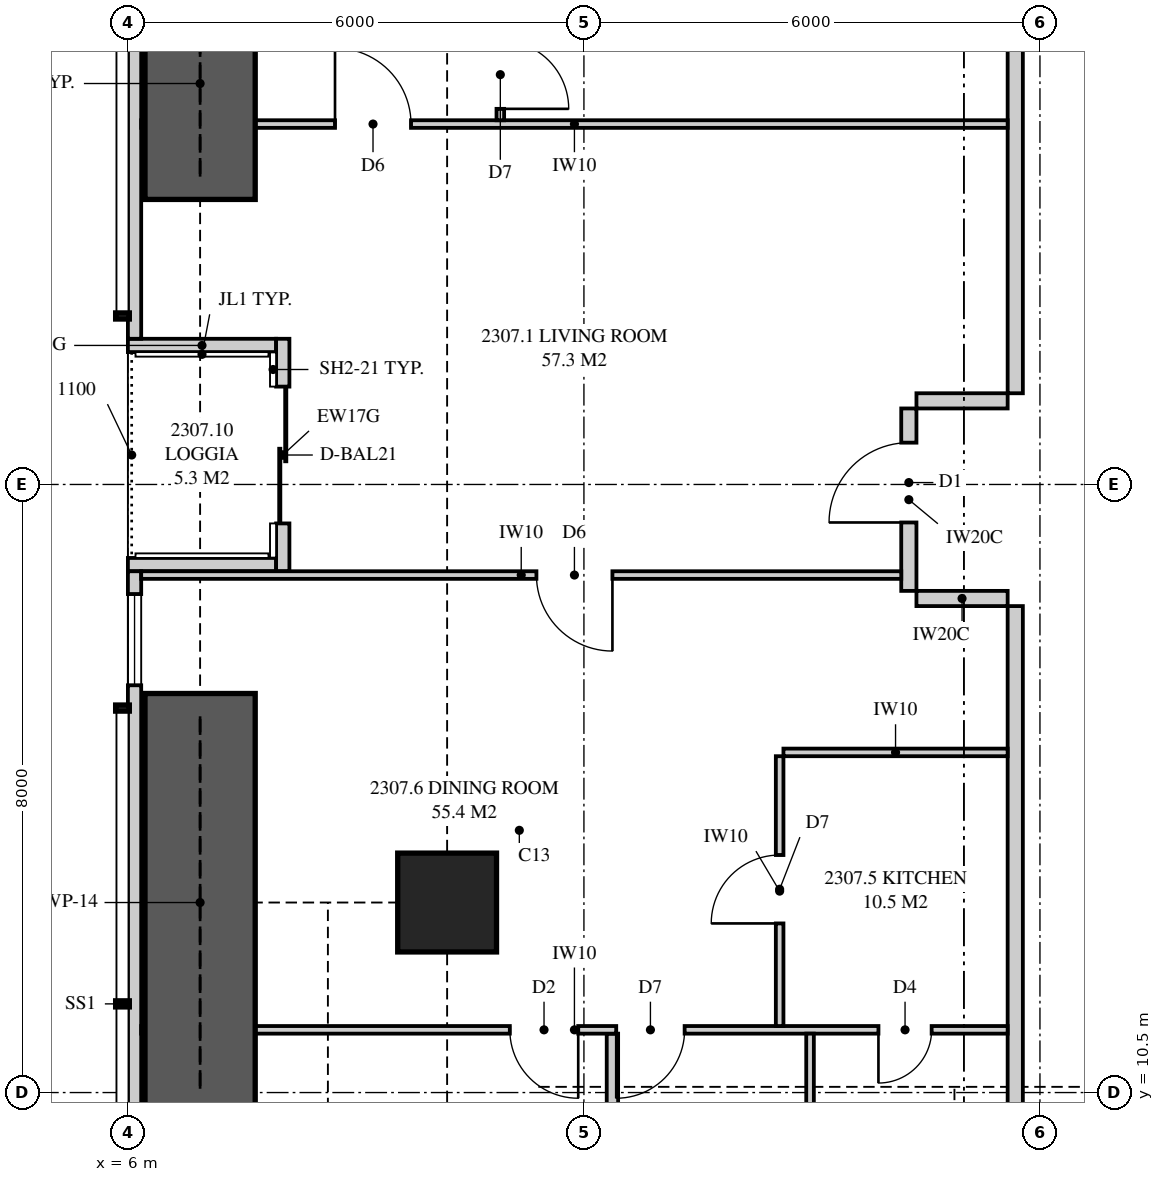
"""IFC4 building model, lengths in metres.
Left out: names, types, materials, properties, quantities, classifications, styles, units other than length and angle.
Written with IfcOpenShell. Run it as: python <this file> out.ifc"""

import sys

from ifc_helpers import new_model, si_unit, direction, frame, frame_2d, origin, origin_2d, place, context, subcontext, project, spatial, polyline, rectangle, outline, extrude, element, fill, save


model = new_model("IFC4")
c1 = context("Model", 3, precision=1e-05, world=origin(), true_north=direction((0.0, 1.0)))
c2 = subcontext(c1, "Body", "Model", "MODEL_VIEW")
j1 = project(units=[si_unit("LENGTHUNIT", "METRE"), si_unit("PLANEANGLEUNIT", "RADIAN")], contexts=[c1])
p1 = place(None, origin())
s1 = spatial("IfcSite", under=j1, at=p1, CompositionType="ELEMENT")
p2 = place(p1, origin())
s2 = spatial("IfcBuilding", under=s1, at=p2, CompositionType="ELEMENT")
p3 = place(p2, frame((0.0, 0.0, 88.1)))
s3 = spatial("IfcBuildingStorey", under=s2, at=p3, CompositionType="ELEMENT", Elevation=88.1)
p4 = place(p3, frame((10.2, 13.0, 0.0), z_axis=(0.0, 0.0, 1.0), x_axis=(1.0, 0.0, 0.0)))
e1 = element("IfcColumn", 1, at=p4, inside=s3, PredefinedType="COLUMN", context=c2, shape_type="SweptSolid", body=[
    extrude(rectangle(XDim=1.3, YDim=1.3, at=origin_2d()), origin(), (0.0, 0.0, 1.0), 3.35),
])
p5 = place(p3, frame((6.087, 34.949, 0.0), z_axis=(0.0, 0.0, 1.0), x_axis=(0.0, -1.0, 0.0)))
e2 = element("IfcWall", 2, at=p5, inside=s3, PredefinedType="SOLIDWALL", context=c2, shape_type="SweptSolid", body=[
    extrude(outline(polyline([(0.0, 0.0), (14.532, 0.0), (14.532, 2.15), (9.949, 2.15), (9.949, 3.11), (9.823, 3.11), (9.823, 2.15), (9.73, 2.15), (9.73, 3.11), (0.0, 3.11), (0.0, 0.0)])), frame((0.0, 0.087, 0.0), z_axis=(0.0, -1.0, 0.0), x_axis=(1.0, 0.0, 0.0)), (0.0, 0.0, 1.0), 0.175),
])
p6 = place(p5, frame((2.724, 0.0, 0.4)))
e3 = element("IfcOpeningElement", 3, at=p6, cuts=e2, PredefinedType="OPENING", context=c2, shape_type="SweptSolid", body=[
    extrude(rectangle(XDim=1.8, YDim=1.7, at=frame_2d((0.9, 0.85))), frame((0.0, 0.097, 0.0), z_axis=(0.0, -1.0, 0.0), x_axis=(1.0, 0.0, 0.0)), (0.0, 0.0, 1.0), 0.195),
])
p7 = place(p5, frame((5.874, 0.0, 0.4)))
e4 = element("IfcOpeningElement", 4, at=p7, cuts=e2, PredefinedType="OPENING", context=c2, shape_type="SweptSolid", body=[
    extrude(rectangle(XDim=1.2, YDim=1.7, at=frame_2d((0.6, 0.85))), frame((0.0, 0.097, 0.0), z_axis=(0.0, -1.0, 0.0), x_axis=(1.0, 0.0, 0.0)), (0.0, 0.0, 1.0), 0.195),
])
p8 = place(p3, frame((6.087, 17.358, 0.0), z_axis=(0.0, 0.0, 1.0), x_axis=(0.0, -1.0, 0.0)))
e5 = element("IfcWall", 5, at=p8, inside=s3, PredefinedType="SOLIDWALL", context=c2, shape_type="SweptSolid", body=[
    extrude(outline(polyline([(0.0, 0.0), (14.307, 0.0), (14.307, 3.11), (4.577, 3.11), (4.577, 2.15), (4.484, 2.15), (4.484, 3.11), (4.358, 3.11), (4.358, 2.15), (0.0, 2.15), (0.0, 0.0)])), frame((0.0, 0.087, 0.0), z_axis=(0.0, -1.0, 0.0), x_axis=(1.0, 0.0, 0.0)), (0.0, 0.0, 1.0), 0.175),
])
p9 = place(p8, frame((0.3, 0.0, 0.4)))
e6 = element("IfcOpeningElement", 6, at=p9, cuts=e5, PredefinedType="OPENING", context=c2, shape_type="SweptSolid", body=[
    extrude(rectangle(XDim=1.2, YDim=1.7, at=frame_2d((0.6, 0.85))), frame((0.0, 0.097, 0.0), z_axis=(0.0, -1.0, 0.0), x_axis=(1.0, 0.0, 0.0)), (0.0, 0.0, 1.0), 0.195),
])
p10 = place(p8, frame((7.233, 0.0, 0.4)))
e7 = element("IfcOpeningElement", 7, at=p10, cuts=e5, PredefinedType="OPENING", context=c2, shape_type="SweptSolid", body=[
    extrude(rectangle(XDim=1.8, YDim=1.7, at=frame_2d((0.9, 0.85))), frame((0.0, 0.097, 0.0), z_axis=(0.0, -1.0, 0.0), x_axis=(1.0, 0.0, 0.0)), (0.0, 0.0, 1.0), 0.195),
])
p11 = place(p8, frame((10.283, 0.0, 0.4)))
e8 = element("IfcOpeningElement", 8, at=p11, cuts=e5, PredefinedType="OPENING", context=c2, shape_type="SweptSolid", body=[
    extrude(rectangle(XDim=1.8, YDim=1.7, at=frame_2d((0.9, 0.85))), frame((0.0, 0.097, 0.0), z_axis=(0.0, -1.0, 0.0), x_axis=(1.0, 0.0, 0.0)), (0.0, 0.0, 1.0), 0.195),
])
p12 = place(p3, frame((8.038, 20.417, 0.0), z_axis=(0.0, 0.0, 1.0), x_axis=(0.0, -1.0, 0.0)))
e9 = element("IfcWall", 9, at=p12, inside=s3, PredefinedType="SOLIDWALL", context=c2, shape_type="SweptSolid", body=[
    extrude(rectangle(XDim=3.058, YDim=0.175, at=frame_2d((1.529, 0.0))), origin(), (0.0, 0.0, 1.0), 3.11),
])
p13 = place(p12, frame((0.629, 0.0, 0.0)))
e10 = element("IfcOpeningElement", 10, at=p13, cuts=e9, PredefinedType="OPENING", context=c2, shape_type="SweptSolid", body=[
    extrude(rectangle(XDim=1.8, YDim=2.1, at=frame_2d((0.9, 1.05))), frame((0.0, 0.097, 0.0), z_axis=(0.0, -1.0, 0.0), x_axis=(1.0, 0.0, 0.0)), (0.0, 0.0, 1.0), 0.195),
])
for number, where, z_axis, x_axis in (
    (11, (6.0, 20.329, 0.0), (0.0, 0.0, 1.0), (1.0, 0.0, 0.0)),
    (12, (6.0, 17.446, 0.0), (0.0, 0.0, 1.0), (1.0, 0.0, 0.0)),
):
    element("IfcWall", number, at=place(p3, frame(where, z_axis=z_axis, x_axis=x_axis)), inside=s3, PredefinedType="SOLIDWALL", context=c2, shape_type="SweptSolid", body=[
        extrude(outline(polyline([(0.0, 0.0), (1.95, 0.0), (1.95, 3.11), (1.75, 3.11), (1.75, 2.15), (0.15, 2.15), (0.15, 3.11), (0.0, 3.11), (0.0, 0.0)])), frame((0.0, 0.087, 0.0), z_axis=(0.0, -1.0, 0.0), x_axis=(1.0, 0.0, 0.0)), (0.0, 0.0, 1.0), 0.175),
    ])
p14 = place(p3, frame((17.675, 7.825, 0.0), z_axis=(0.0, 0.0, 1.0), x_axis=(0.0, 1.0, 0.0)))
e13 = element("IfcWall", 13, at=p14, inside=s3, PredefinedType="PARTITIONING", context=c2, shape_type="SweptSolid", body=[
    extrude(outline(polyline([(0.0, 0.0), (9.075, 0.0), (9.075, 3.11), (3.096, 3.11), (3.096, 2.531), (2.404, 2.531), (2.404, 3.11), (0.0, 3.11), (0.0, 0.0)])), frame((0.0, 0.1, 0.0), z_axis=(0.0, -1.0, 0.0), x_axis=(1.0, 0.0, 0.0)), (0.0, 0.0, 1.0), 0.2),
])
p15 = place(p3, frame((6.175, 11.325, 0.0), z_axis=(0.0, 0.0, 1.0), x_axis=(1.0, 0.0, 0.0)))
e14 = element("IfcWall", 14, at=p15, inside=s3, PredefinedType="PARTITIONING", context=c2, shape_type="SweptSolid", body=[
    extrude(outline(polyline([(0.175, 3.11), (0.0, 3.11), (0.0, 0.0), (0.526, 0.0), (0.526, 0.337), (1.024, 0.337), (1.024, 0.0), (11.4, 0.0), (11.4, 3.11), (5.285, 3.11), (5.285, 2.51), (2.765, 2.51), (2.765, 3.11), (2.753, 3.11), (2.753, 2.531), (2.16, 2.531), (2.16, 3.11), (1.918, 3.11), (1.918, 2.15), (1.024, 2.15), (1.024, 1.813), (0.526, 1.813), (0.526, 2.15), (0.175, 2.15), (0.175, 3.11)])), frame((0.0, 0.05, 0.0), z_axis=(0.0, -1.0, 0.0), x_axis=(1.0, 0.0, 0.0)), (0.0, 0.0, 1.0), 0.1),
])
p16 = place(p15, frame((4.85, 0.0, 0.0)))
e15 = element("IfcOpeningElement", 15, at=p16, cuts=e14, PredefinedType="OPENING", context=c2, shape_type="SweptSolid", body=[
    extrude(rectangle(XDim=0.9, YDim=2.1, at=frame_2d((0.45, 1.05))), frame((0.0, 0.06, 0.0), z_axis=(0.0, -1.0, 0.0), x_axis=(1.0, 0.0, 0.0)), (0.0, 0.0, 1.0), 0.12),
])
p17 = place(p15, frame((6.25, 0.0, 0.0)))
e16 = element("IfcOpeningElement", 16, at=p17, cuts=e14, PredefinedType="OPENING", context=c2, shape_type="SweptSolid", body=[
    extrude(rectangle(XDim=0.9, YDim=2.1, at=frame_2d((0.45, 1.05))), frame((0.0, 0.06, 0.0), z_axis=(0.0, -1.0, 0.0), x_axis=(1.0, 0.0, 0.0)), (0.0, 0.0, 1.0), 0.12),
])
p18 = place(p15, frame((9.7, 0.0, 0.0)))
e17 = element("IfcOpeningElement", 17, at=p18, cuts=e14, PredefinedType="OPENING", context=c2, shape_type="SweptSolid", body=[
    extrude(rectangle(XDim=0.7, YDim=2.1, at=frame_2d((0.35, 1.05))), frame((0.0, 0.06, 0.0), z_axis=(0.0, -1.0, 0.0), x_axis=(1.0, 0.0, 0.0)), (0.0, 0.0, 1.0), 0.12),
])
p19 = place(p3, frame((12.375, 7.825, 0.0), z_axis=(0.0, 0.0, 1.0), x_axis=(0.0, 1.0, 0.0)))
e18 = element("IfcWall", 18, at=p19, inside=s3, PredefinedType="PLUMBINGWALL", context=c2, shape_type="SweptSolid", body=[
    extrude(outline(polyline([(0.0, 0.0), (3.45, 0.0), (3.45, 3.11), (3.071, 3.11), (3.071, 2.531), (2.429, 2.531), (2.429, 3.11), (0.0, 3.11), (0.0, 0.0)])), frame((0.0, 0.075, 0.0), z_axis=(0.0, -1.0, 0.0), x_axis=(1.0, 0.0, 0.0)), (0.0, 0.0, 1.0), 0.15),
])
p20 = place(p3, frame((14.975, 7.825, 0.0), z_axis=(0.0, 0.0, 1.0), x_axis=(0.0, 1.0, 0.0)))
e19 = element("IfcWall", 19, at=p20, inside=s3, PredefinedType="PARTITIONING", context=c2, shape_type="SweptSolid", body=[
    extrude(outline(polyline([(0.0, 0.0), (3.45, 0.0), (3.45, 3.11), (3.046, 3.11), (3.046, 2.531), (2.454, 2.531), (2.454, 3.11), (0.0, 3.11), (0.0, 0.0)])), frame((0.0, 0.05, 0.0), z_axis=(0.0, -1.0, 0.0), x_axis=(1.0, 0.0, 0.0)), (0.0, 0.0, 1.0), 0.1),
])
p21 = place(p3, frame((14.575, 11.375, 0.0), z_axis=(0.0, 0.0, 1.0), x_axis=(0.0, 1.0, 0.0)))
e20 = element("IfcWall", 20, at=p21, inside=s3, PredefinedType="PARTITIONING", context=c2, shape_type="SweptSolid", body=[
    extrude(rectangle(XDim=3.55, YDim=0.1, at=frame_2d((1.775, 0.0))), origin(), (0.0, 0.0, 1.0), 3.11),
])
p22 = place(p21, frame((1.35, 0.0, 0.0)))
e21 = element("IfcOpeningElement", 21, at=p22, cuts=e20, PredefinedType="OPENING", context=c2, shape_type="SweptSolid", body=[
    extrude(rectangle(XDim=0.9, YDim=2.1, at=frame_2d((0.45, 1.05))), frame((0.0, 0.06, 0.0), z_axis=(0.0, -1.0, 0.0), x_axis=(1.0, 0.0, 0.0)), (0.0, 0.0, 1.0), 0.12),
])
p23 = place(p3, frame((14.625, 14.975, 0.0), z_axis=(0.0, 0.0, 1.0), x_axis=(1.0, 0.0, 0.0)))
e22 = element("IfcWall", 22, at=p23, inside=s3, PredefinedType="PARTITIONING", context=c2, shape_type="SweptSolid", body=[
    extrude(rectangle(XDim=2.95, YDim=0.1, at=frame_2d((1.475, 0.0))), origin(), (0.0, 0.0, 1.0), 3.11),
])
p24 = place(p3, frame((6.175, 17.308, 0.0), z_axis=(0.0, 0.0, 1.0), x_axis=(1.0, 0.0, 0.0)))
e23 = element("IfcWall", 23, at=p24, inside=s3, PredefinedType="PARTITIONING", context=c2, shape_type="SweptSolid", body=[
    extrude(outline(polyline([(0.0, 0.0), (10.0, 0.0), (10.0, 3.11), (5.285, 3.11), (5.285, 2.51), (2.765, 2.51), (2.765, 3.11), (1.635, 3.11), (1.635, 2.15), (0.0, 2.15), (0.0, 3.11), (0.0, 0.0)])), frame((0.0, 0.05, 0.0), z_axis=(0.0, -1.0, 0.0), x_axis=(1.0, 0.0, 0.0)), (0.0, 0.0, 1.0), 0.1),
])
p25 = place(p24, frame((5.2, 0.0, 0.0)))
e24 = element("IfcOpeningElement", 24, at=p25, cuts=e23, PredefinedType="OPENING", context=c2, shape_type="SweptSolid", body=[
    extrude(rectangle(XDim=1.0, YDim=2.1, at=frame_2d((0.5, 1.05))), frame((0.0, 0.06, 0.0), z_axis=(0.0, -1.0, 0.0), x_axis=(1.0, 0.0, 0.0)), (0.0, 0.0, 1.0), 0.12),
])
p26 = place(p3, frame((6.175, 23.242, 0.0), z_axis=(0.0, 0.0, 1.0), x_axis=(1.0, 0.0, 0.0)))
e25 = element("IfcWall", 25, at=p26, inside=s3, PredefinedType="PARTITIONING", context=c2, shape_type="SweptSolid", body=[
    extrude(outline(polyline([(0.526, 2.15), (0.0, 2.15), (0.0, 0.0), (0.526, 0.0), (0.526, 0.28), (1.024, 0.28), (1.024, 0.0), (11.4, 0.0), (11.4, 3.11), (5.285, 3.11), (5.285, 2.51), (2.765, 2.51), (2.765, 3.11), (1.635, 3.11), (1.635, 2.15), (1.024, 2.15), (1.024, 1.87), (0.526, 1.87), (0.526, 2.15)])), frame((0.0, 0.05, 0.0), z_axis=(0.0, -1.0, 0.0), x_axis=(1.0, 0.0, 0.0)), (0.0, 0.0, 1.0), 0.1),
])
p27 = place(p26, frame((2.55, 0.0, 0.0)))
e26 = element("IfcOpeningElement", 26, at=p27, cuts=e25, PredefinedType="OPENING", context=c2, shape_type="SweptSolid", body=[
    extrude(rectangle(XDim=1.0, YDim=2.1, at=frame_2d((0.5, 1.05))), frame((0.0, 0.06, 0.0), z_axis=(0.0, -1.0, 0.0), x_axis=(1.0, 0.0, 0.0)), (0.0, 0.0, 1.0), 0.12),
])
p28 = place(p3, frame((17.675, 19.7, 0.0), z_axis=(0.0, 0.0, 1.0), x_axis=(0.0, 1.0, 0.0)))
e27 = element("IfcWall", 27, at=p28, inside=s3, PredefinedType="PARTITIONING", context=c2, shape_type="SweptSolid", body=[
    extrude(outline(polyline([(0.0, 0.0), (9.475, 0.0), (9.475, 3.11), (7.071, 3.11), (7.071, 2.531), (6.379, 2.531), (6.379, 3.11), (0.0, 3.11), (0.0, 0.0)])), frame((0.0, 0.1, 0.0), z_axis=(0.0, -1.0, 0.0), x_axis=(1.0, 0.0, 0.0)), (0.0, 0.0, 1.0), 0.2),
])
p29 = place(p3, frame((16.275, 17.1, 0.0), z_axis=(0.0, 0.0, 1.0), x_axis=(0.0, 1.0, 0.0)))
e28 = element("IfcWall", 28, at=p29, inside=s3, PredefinedType="PARTITIONING", context=c2, shape_type="SweptSolid", body=[
    extrude(rectangle(XDim=2.4, YDim=0.2, at=frame_2d((1.2, 0.0))), origin(), (0.0, 0.0, 1.0), 3.11),
])
p30 = place(p29, frame((0.9, 0.0, 0.0)))
e29 = element("IfcOpeningElement", 29, at=p30, cuts=e28, PredefinedType="OPENING", context=c2, shape_type="SweptSolid", body=[
    extrude(rectangle(XDim=1.05, YDim=2.2, at=frame_2d((0.525, 1.1))), frame((0.0, 0.11, 0.0), z_axis=(0.0, -1.0, 0.0), x_axis=(1.0, 0.0, 0.0)), (0.0, 0.0, 1.0), 0.22),
])
for number, where, z_axis, x_axis in (
    (30, (17.575, 17.0, 0.0), (0.0, 0.0, 1.0), (-1.0, 0.0, 0.0)),
    (31, (17.575, 19.6, 0.0), (0.0, 0.0, 1.0), (-1.0, 0.0, 0.0)),
):
    element("IfcWall", number, at=place(p3, frame(where, z_axis=z_axis, x_axis=x_axis)), inside=s3, PredefinedType="PARTITIONING", context=c2, shape_type="SweptSolid", body=[
        extrude(rectangle(XDim=1.2, YDim=0.2, at=frame_2d((0.6, 0.0))), origin(), (0.0, 0.0, 1.0), 3.11),
    ])
p31 = place(p3, frame((10.9, 23.292, 0.0), z_axis=(0.0, 0.0, 1.0), x_axis=(0.0, 1.0, 0.0)))
e32 = element("IfcWall", 32, at=p31, inside=s3, PredefinedType="PARTITIONING", context=c2, shape_type="SweptSolid", body=[
    extrude(outline(polyline([(0.0, 0.0), (5.883, 0.0), (5.883, 3.11), (5.883, 2.51), (1.768, 2.51), (0.0, 2.51), (0.0, 3.11), (0.0, 0.0)])), frame((0.0, 0.05, 0.0), z_axis=(0.0, -1.0, 0.0), x_axis=(1.0, 0.0, 0.0)), (0.0, 0.0, 1.0), 0.1),
])
p32 = place(p31, frame((0.15, 0.0, 0.0)))
e33 = element("IfcOpeningElement", 33, at=p32, cuts=e32, PredefinedType="OPENING", context=c2, shape_type="SweptSolid", body=[
    extrude(rectangle(XDim=0.9, YDim=2.1, at=frame_2d((0.45, 1.05))), frame((0.0, 0.06, 0.0), z_axis=(0.0, -1.0, 0.0), x_axis=(1.0, 0.0, 0.0)), (0.0, 0.0, 1.0), 0.12),
])
p33 = place(p31, frame((4.017, 0.0, 0.0)))
e34 = element("IfcOpeningElement", 34, at=p33, cuts=e32, PredefinedType="OPENING", context=c2, shape_type="SweptSolid", body=[
    extrude(rectangle(XDim=0.9, YDim=2.1, at=frame_2d((0.45, 1.05))), frame((0.0, 0.06, 0.0), z_axis=(0.0, -1.0, 0.0), x_axis=(1.0, 0.0, 0.0)), (0.0, 0.0, 1.0), 0.12),
])
for number, where, z_axis, x_axis in (
    (35, (6.95, 22.25, 0.0), (0.0, 0.0, 1.0), (0.0, 1.0, 0.0)),
    (36, (6.95, 10.25, 0.0), (0.0, 0.0, 1.0), (0.0, 1.0, 0.0)),
):
    element("IfcWall", number, at=place(p3, frame(where, z_axis=z_axis, x_axis=x_axis)), inside=s3, PredefinedType="SHEAR", context=c2, shape_type="SweptSolid", body=[
        extrude(rectangle(XDim=5.5, YDim=1.45, at=frame_2d((2.75, 0.0))), origin(), (0.0, 0.0, 1.0), 3.35),
    ])
p34 = place(p13, origin())
e37 = element("IfcDoor", 37, at=p34, inside=s3, OperationType="SLIDING_TO_LEFT", PredefinedType="DOOR", context=c2, shape_type="SweptSolid", body=[
    extrude(rectangle(XDim=1.8, YDim=2.1, at=frame_2d((0.9, 1.05))), frame((0.0, 0.025, 0.0), z_axis=(0.0, -1.0, 0.0), x_axis=(1.0, 0.0, 0.0)), (0.0, 0.0, 1.0), 0.05),
])
fill(e10, e37)
p35 = place(p9, origin())
e38 = element("IfcWindow", 38, at=p35, inside=s3, PartitioningType="SINGLE_PANEL", PredefinedType="WINDOW", context=c2, shape_type="SweptSolid", body=[
    extrude(rectangle(XDim=1.2, YDim=1.7, at=frame_2d((0.6, 0.85))), frame((0.0, 0.03, 0.0), z_axis=(0.0, -1.0, 0.0), x_axis=(1.0, 0.0, 0.0)), (0.0, 0.0, 1.0), 0.06),
])
fill(e6, e38)
p36 = place(p30, origin())
e39 = element("IfcDoor", 39, at=p36, inside=s3, OperationType="SINGLE_SWING_LEFT", PredefinedType="DOOR", context=c2, shape_type="SweptSolid", body=[
    extrude(rectangle(XDim=1.05, YDim=2.2, at=frame_2d((0.525, 1.1))), frame((0.0, 0.025, 0.0), z_axis=(0.0, -1.0, 0.0), x_axis=(1.0, 0.0, 0.0)), (0.0, 0.0, 1.0), 0.05),
])
fill(e29, e39)
p37 = place(p16, frame((0.9, 0.0, 0.0), z_axis=(0.0, 0.0, 1.0), x_axis=(-1.0, 0.0, 0.0)))
e40 = element("IfcDoor", 40, at=p37, inside=s3, OperationType="SINGLE_SWING_LEFT", PredefinedType="DOOR", context=c2, shape_type="SweptSolid", body=[
    extrude(rectangle(XDim=0.9, YDim=2.1, at=frame_2d((0.45, 1.05))), frame((0.0, 0.025, 0.0), z_axis=(0.0, -1.0, 0.0), x_axis=(1.0, 0.0, 0.0)), (0.0, 0.0, 1.0), 0.05),
])
fill(e15, e40)
p38 = place(p17, frame((0.9, 0.0, 0.0), z_axis=(0.0, 0.0, 1.0), x_axis=(-1.0, 0.0, 0.0)))
e41 = element("IfcDoor", 41, at=p38, inside=s3, OperationType="SINGLE_SWING_RIGHT", PredefinedType="DOOR", context=c2, shape_type="SweptSolid", body=[
    extrude(rectangle(XDim=0.9, YDim=2.1, at=frame_2d((0.45, 1.05))), frame((0.0, 0.025, 0.0), z_axis=(0.0, -1.0, 0.0), x_axis=(1.0, 0.0, 0.0)), (0.0, 0.0, 1.0), 0.05),
])
fill(e16, e41)
p39 = place(p18, frame((0.7, 0.0, 0.0), z_axis=(0.0, 0.0, 1.0), x_axis=(-1.0, 0.0, 0.0)))
e42 = element("IfcDoor", 42, at=p39, inside=s3, OperationType="SINGLE_SWING_RIGHT", PredefinedType="DOOR", context=c2, shape_type="SweptSolid", body=[
    extrude(rectangle(XDim=0.7, YDim=2.1, at=frame_2d((0.35, 1.05))), frame((0.0, 0.025, 0.0), z_axis=(0.0, -1.0, 0.0), x_axis=(1.0, 0.0, 0.0)), (0.0, 0.0, 1.0), 0.05),
])
fill(e17, e42)
p40 = place(p22, origin())
e43 = element("IfcDoor", 43, at=p40, inside=s3, OperationType="SINGLE_SWING_LEFT", PredefinedType="DOOR", context=c2, shape_type="SweptSolid", body=[
    extrude(rectangle(XDim=0.9, YDim=2.1, at=frame_2d((0.45, 1.05))), frame((0.0, 0.025, 0.0), z_axis=(0.0, -1.0, 0.0), x_axis=(1.0, 0.0, 0.0)), (0.0, 0.0, 1.0), 0.05),
])
fill(e21, e43)
p41 = place(p25, frame((1.0, 0.0, 0.0), z_axis=(0.0, 0.0, 1.0), x_axis=(-1.0, 0.0, 0.0)))
e44 = element("IfcDoor", 44, at=p41, inside=s3, OperationType="SINGLE_SWING_LEFT", PredefinedType="DOOR", context=c2, shape_type="SweptSolid", body=[
    extrude(rectangle(XDim=1.0, YDim=2.1, at=frame_2d((0.5, 1.05))), frame((0.0, 0.025, 0.0), z_axis=(0.0, -1.0, 0.0), x_axis=(1.0, 0.0, 0.0)), (0.0, 0.0, 1.0), 0.05),
])
fill(e24, e44)
p42 = place(p27, origin())
e45 = element("IfcDoor", 45, at=p42, inside=s3, OperationType="SINGLE_SWING_LEFT", PredefinedType="DOOR", context=c2, shape_type="SweptSolid", body=[
    extrude(rectangle(XDim=1.0, YDim=2.1, at=frame_2d((0.5, 1.05))), frame((0.0, 0.025, 0.0), z_axis=(0.0, -1.0, 0.0), x_axis=(1.0, 0.0, 0.0)), (0.0, 0.0, 1.0), 0.05),
])
fill(e26, e45)
p43 = place(p32, frame((0.9, 0.0, 0.0), z_axis=(0.0, 0.0, 1.0), x_axis=(-1.0, 0.0, 0.0)))
e46 = element("IfcDoor", 46, at=p43, inside=s3, OperationType="SINGLE_SWING_RIGHT", PredefinedType="DOOR", context=c2, shape_type="SweptSolid", body=[
    extrude(rectangle(XDim=0.9, YDim=2.1, at=frame_2d((0.45, 1.05))), frame((0.0, 0.025, 0.0), z_axis=(0.0, -1.0, 0.0), x_axis=(1.0, 0.0, 0.0)), (0.0, 0.0, 1.0), 0.05),
])
fill(e33, e46)
save(model, sys.argv[1])
